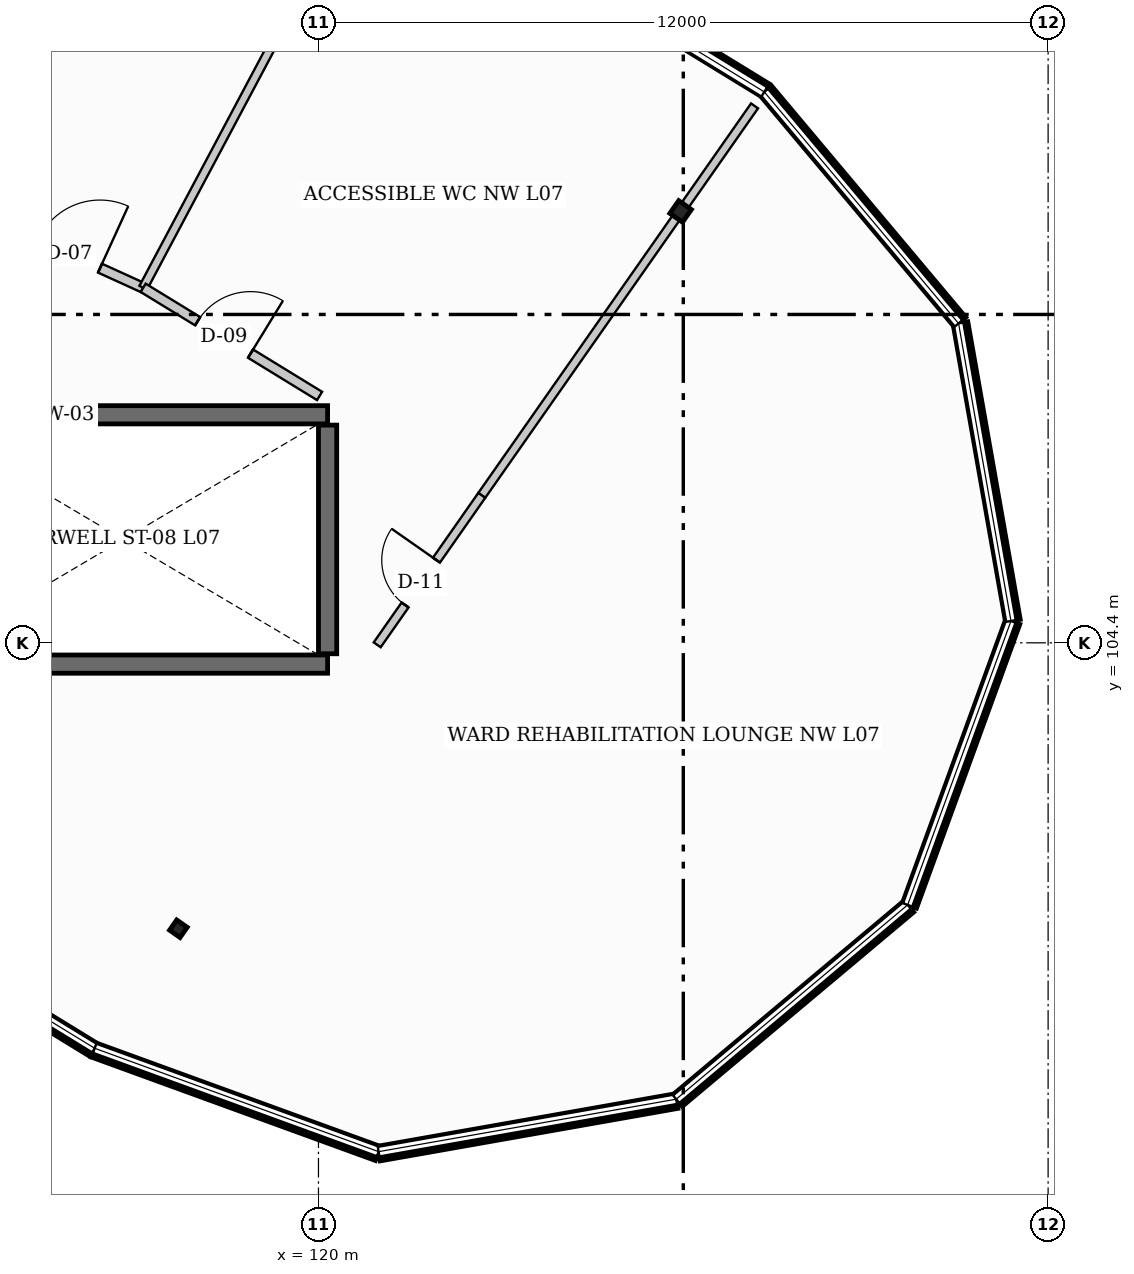
"""IFC4 building model, lengths in metres.
Left out: names, types, materials, properties, quantities, classifications, styles, units other than length and angle.
Written with IfcOpenShell. Run it as: python <this file> out.ifc"""

import sys

from ifc_helpers import new_model, si_unit, direction, frame, frame_2d, origin, origin_2d, place, context, subcontext, project, spatial, rectangle, i_section, extrude, element, fill, save


model = new_model("IFC4")
c1 = context("Model", 3, precision=1e-05, world=origin(), true_north=direction((0.0, 1.0)))
c2 = subcontext(c1, "Body", "Model", "MODEL_VIEW")
j1 = project(units=[si_unit("LENGTHUNIT", "METRE"), si_unit("PLANEANGLEUNIT", "RADIAN")], contexts=[c1])
p1 = place(None, origin())
s1 = spatial("IfcSite", under=j1, at=p1, CompositionType="ELEMENT")
p2 = place(p1, origin())
s2 = spatial("IfcBuilding", under=s1, at=p2, CompositionType="ELEMENT")
p3 = place(p2, frame((0.0, 0.0, 30.0)))
s3 = spatial("IfcBuildingStorey", under=s2, at=p3, CompositionType="ELEMENT", Elevation=30.0)
p4 = place(p3, frame((125.956, 111.494, 0.0), z_axis=(0.0, 0.0, 1.0), x_axis=(0.573576436351, 0.819152044289, 0.0)))
e1 = element("IfcColumn", 1, at=p4, inside=s3, PredefinedType="COLUMN", context=c2, shape_type="SweptSolid", body=[
    extrude(i_section(OverallWidth=0.254, OverallDepth=0.254, WebThickness=0.009, FlangeThickness=0.014, at=origin_2d()), origin(), (0.0, 0.0, 1.0), 3.9),
])
p5 = place(p3, frame((117.696, 99.698, 0.0), z_axis=(0.0, 0.0, 1.0), x_axis=(0.573576436351, 0.819152044289, 0.0)))
e2 = element("IfcColumn", 2, at=p5, inside=s3, PredefinedType="COLUMN", context=c2, shape_type="SweptSolid", body=[
    extrude(i_section(OverallWidth=0.205, OverallDepth=0.21, WebThickness=0.009, FlangeThickness=0.014, at=origin_2d()), origin(), (0.0, 0.0, 1.0), 3.9),
])
p6 = place(p3, frame((111.45, 104.05, 0.0), z_axis=(0.0, 0.0, 1.0), x_axis=(1.0, 0.0, 0.0)))
e3 = element("IfcWall", 3, at=p6, inside=s3, PredefinedType="SHEAR", context=c2, shape_type="SweptSolid", body=[
    extrude(rectangle(XDim=8.7, YDim=0.3, at=frame_2d((4.35, 0.0))), origin(), (0.0, 0.0, 1.0), 3.9),
])
p7 = place(p6, frame((0.35, 0.0, 0.0)))
e4 = element("IfcOpeningElement", 4, at=p7, cuts=e3, PredefinedType="OPENING", context=c2, shape_type="SweptSolid", body=[
    extrude(rectangle(XDim=1.1, YDim=2.15, at=frame_2d((0.55, 1.075))), frame((0.0, 0.16, 0.0), z_axis=(0.0, -1.0, 0.0), x_axis=(1.0, 0.0, 0.0)), (0.0, 0.0, 1.0), 0.32),
])
p8 = place(p3, frame((120.15, 108.15, 0.0), z_axis=(0.0, 0.0, 1.0), x_axis=(-1.0, 0.0, 0.0)))
e5 = element("IfcWall", 5, at=p8, inside=s3, PredefinedType="SHEAR", context=c2, shape_type="SweptSolid", body=[
    extrude(rectangle(XDim=8.7, YDim=0.3, at=frame_2d((4.35, 0.0))), origin(), (0.0, 0.0, 1.0), 3.9),
])
p9 = place(p3, frame((120.15, 104.22, 0.0), z_axis=(0.0, 0.0, 1.0), x_axis=(0.0, 1.0, 0.0)))
e6 = element("IfcWall", 6, at=p9, inside=s3, PredefinedType="SHEAR", context=c2, shape_type="SweptSolid", body=[
    extrude(rectangle(XDim=3.76, YDim=0.3, at=frame_2d((1.88, 0.0))), origin(), (0.0, 0.0, 1.0), 3.9),
])
p10 = place(p3, frame((116.32, 97.732, 0.0), z_axis=(0.0, 0.0, 1.0), x_axis=(-0.852628362135, 0.522517823698, 0.0)))
e7 = element("IfcWall", 7, at=p10, inside=s3, PredefinedType="STANDARD", context=c2, shape_type="SweptSolid", body=[
    extrude(rectangle(XDim=5.177, YDim=0.22, at=frame_2d((2.588, 0.0))), origin(), (0.0, 0.0, 1.0), 1.05),
])
p11 = place(p3, frame((120.989, 96.032, 0.0), z_axis=(0.0, 0.0, 1.0), x_axis=(-0.939654190044, 0.34212571247, 0.0)))
e8 = element("IfcWall", 8, at=p11, inside=s3, PredefinedType="STANDARD", context=c2, shape_type="SweptSolid", body=[
    extrude(rectangle(XDim=4.969, YDim=0.22, at=frame_2d((2.484, 0.0))), origin(), (0.0, 0.0, 1.0), 1.05),
])
p12 = place(p3, frame((125.883, 96.895, 0.0), z_axis=(0.0, 0.0, 1.0), x_axis=(-0.984804817938, -0.173664822479, 0.0)))
e9 = element("IfcWall", 9, at=p12, inside=s3, PredefinedType="STANDARD", context=c2, shape_type="SweptSolid", body=[
    extrude(rectangle(XDim=4.969, YDim=0.22, at=frame_2d((2.485, 0.0))), origin(), (0.0, 0.0, 1.0), 1.05),
])
p13 = place(p3, frame((129.69, 100.09, 0.0), z_axis=(0.0, 0.0, 1.0), x_axis=(-0.765973821879, -0.642871763415, 0.0)))
e10 = element("IfcWall", 10, at=p13, inside=s3, PredefinedType="STANDARD", context=c2, shape_type="SweptSolid", body=[
    extrude(rectangle(XDim=4.97, YDim=0.22, at=frame_2d((2.485, 0.0))), origin(), (0.0, 0.0, 1.0), 1.05),
])
p14 = place(p3, frame((131.389, 104.759, 0.0), z_axis=(0.0, 0.0, 1.0), x_axis=(-0.341952160632, -0.939717361678, 0.0)))
e11 = element("IfcWall", 11, at=p14, inside=s3, PredefinedType="STANDARD", context=c2, shape_type="SweptSolid", body=[
    extrude(rectangle(XDim=4.969, YDim=0.22, at=frame_2d((2.484, 0.0))), origin(), (0.0, 0.0, 1.0), 1.05),
])
p15 = place(p3, frame((130.527, 109.653, 0.0), z_axis=(0.0, 0.0, 1.0), x_axis=(0.173426579259, -0.984846801085, 0.0)))
e12 = element("IfcWall", 12, at=p15, inside=s3, PredefinedType="STANDARD", context=c2, shape_type="SweptSolid", body=[
    extrude(rectangle(XDim=4.969, YDim=0.22, at=frame_2d((2.485, 0.0))), origin(), (0.0, 0.0, 1.0), 1.05),
])
p16 = place(p3, frame((127.332, 113.46, 0.0), z_axis=(0.0, 0.0, 1.0), x_axis=(0.642871763415, -0.765973821879, 0.0)))
e13 = element("IfcWall", 13, at=p16, inside=s3, PredefinedType="STANDARD", context=c2, shape_type="SweptSolid", body=[
    extrude(rectangle(XDim=4.97, YDim=0.22, at=frame_2d((2.485, 0.0))), origin(), (0.0, 0.0, 1.0), 1.05),
])
p17 = place(p3, frame((120.919, 117.39, 0.0), z_axis=(0.0, 0.0, 1.0), x_axis=(0.852640903338, -0.522497358803, 0.0)))
e14 = element("IfcWall", 14, at=p17, inside=s3, PredefinedType="STANDARD", context=c2, shape_type="SweptSolid", body=[
    extrude(rectangle(XDim=7.521, YDim=0.22, at=frame_2d((3.761, 0.0))), origin(), (0.0, 0.0, 1.0), 1.05),
])
p18 = place(p3, frame((111.173, 112.947, 0.0), z_axis=(0.0, 0.0, 1.0), x_axis=(0.909948737979, -0.414720742488, 0.0)))
e15 = element("IfcWall", 15, at=p18, inside=s3, PredefinedType="PARTITIONING", context=c2, shape_type="SweptSolid", body=[
    extrude(rectangle(XDim=6.532, YDim=0.16, at=frame_2d((3.266, 0.0))), origin(), (0.0, 0.0, 1.0), 3.428),
])
p19 = place(p18, frame((4.632, 0.0, 0.0)))
e16 = element("IfcOpeningElement", 16, at=p19, cuts=e15, PredefinedType="OPENING", context=c2, shape_type="SweptSolid", body=[
    extrude(rectangle(XDim=1.12, YDim=2.08, at=frame_2d((0.56, 1.04))), frame((0.0, 0.09, 0.0), z_axis=(0.0, -1.0, 0.0), x_axis=(1.0, 0.0, 0.0)), (0.0, 0.0, 1.0), 0.18),
])
p20 = place(p3, frame((117.117, 110.238, 0.0), z_axis=(0.0, 0.0, 1.0), x_axis=(0.469490767167, 0.88293738144, 0.0)))
e17 = element("IfcWall", 17, at=p20, inside=s3, PredefinedType="PARTITIONING", context=c2, shape_type="SweptSolid", body=[
    extrude(rectangle(XDim=7.819, YDim=0.14, at=frame_2d((3.91, 0.0))), origin(), (0.0, 0.0, 1.0), 3.431),
])
p21 = place(p3, frame((117.117, 110.238, 0.0), z_axis=(0.0, 0.0, 1.0), x_axis=(0.852605377196, -0.522555327957, 0.0)))
e18 = element("IfcWall", 18, at=p21, inside=s3, PredefinedType="PARTITIONING", context=c2, shape_type="SweptSolid", body=[
    extrude(rectangle(XDim=3.403, YDim=0.16, at=frame_2d((1.701, 0.0))), origin(), (0.0, 0.0, 1.0), 3.57),
])
p22 = place(p21, frame((1.051, 0.0, 0.0)))
e19 = element("IfcOpeningElement", 19, at=p22, cuts=e18, PredefinedType="OPENING", context=c2, shape_type="SweptSolid", body=[
    extrude(rectangle(XDim=1.02, YDim=2.08, at=frame_2d((0.51, 1.04))), frame((0.0, 0.09, 0.0), z_axis=(0.0, -1.0, 0.0), x_axis=(1.0, 0.0, 0.0)), (0.0, 0.0, 1.0), 0.18),
])
p23 = place(p3, frame((122.686, 106.825, 0.0), z_axis=(0.0, 0.0, 1.0), x_axis=(0.573682336084, 0.819077882295, 0.0)))
e20 = element("IfcWall", 20, at=p23, inside=s3, PredefinedType="PARTITIONING", context=c2, shape_type="SweptSolid", body=[
    extrude(rectangle(XDim=7.82, YDim=0.14, at=frame_2d((3.91, 0.0))), origin(), (0.0, 0.0, 1.0), 3.482),
])
p24 = place(p3, frame((120.966, 104.367, 0.0), z_axis=(0.0, 0.0, 1.0), x_axis=(0.573320330817, 0.819331311663, 0.0)))
e21 = element("IfcWall", 21, at=p24, inside=s3, PredefinedType="PARTITIONING", context=c2, shape_type="SweptSolid", body=[
    extrude(rectangle(XDim=3.0, YDim=0.14, at=frame_2d((1.5, 0.0))), origin(), (0.0, 0.0, 1.0), 3.57),
])
p25 = place(p24, frame((0.8, 0.0, 0.0)))
e22 = element("IfcOpeningElement", 22, at=p25, cuts=e21, PredefinedType="OPENING", context=c2, shape_type="SweptSolid", body=[
    extrude(rectangle(XDim=0.9, YDim=2.1, at=frame_2d((0.45, 1.05))), frame((0.0, 0.08, 0.0), z_axis=(0.0, -1.0, 0.0), x_axis=(1.0, 0.0, 0.0)), (0.0, 0.0, 1.0), 0.16),
])
p26 = place(p19, origin())
e23 = element("IfcDoor", 23, at=p26, inside=s3, OperationType="SINGLE_SWING_RIGHT", PredefinedType="DOOR", context=c2, shape_type="SweptSolid", body=[
    extrude(rectangle(XDim=1.12, YDim=2.08, at=frame_2d((0.56, 1.04))), frame((0.0, 0.025, 0.0), z_axis=(0.0, -1.0, 0.0), x_axis=(1.0, 0.0, 0.0)), (0.0, 0.0, 1.0), 0.05),
])
fill(e16, e23)
p27 = place(p22, origin())
e24 = element("IfcDoor", 24, at=p27, inside=s3, OperationType="SINGLE_SWING_RIGHT", PredefinedType="DOOR", context=c2, shape_type="SweptSolid", body=[
    extrude(rectangle(XDim=1.02, YDim=2.08, at=frame_2d((0.51, 1.04))), frame((0.0, 0.025, 0.0), z_axis=(0.0, -1.0, 0.0), x_axis=(1.0, 0.0, 0.0)), (0.0, 0.0, 1.0), 0.05),
])
fill(e19, e24)
p28 = place(p25, origin())
e25 = element("IfcDoor", 25, at=p28, inside=s3, OperationType="SINGLE_SWING_RIGHT", PredefinedType="DOOR", context=c2, shape_type="SweptSolid", body=[
    extrude(rectangle(XDim=0.9, YDim=2.1, at=frame_2d((0.45, 1.05))), frame((0.0, 0.025, 0.0), z_axis=(0.0, -1.0, 0.0), x_axis=(1.0, 0.0, 0.0)), (0.0, 0.0, 1.0), 0.05),
])
fill(e22, e25)
save(model, sys.argv[1])
